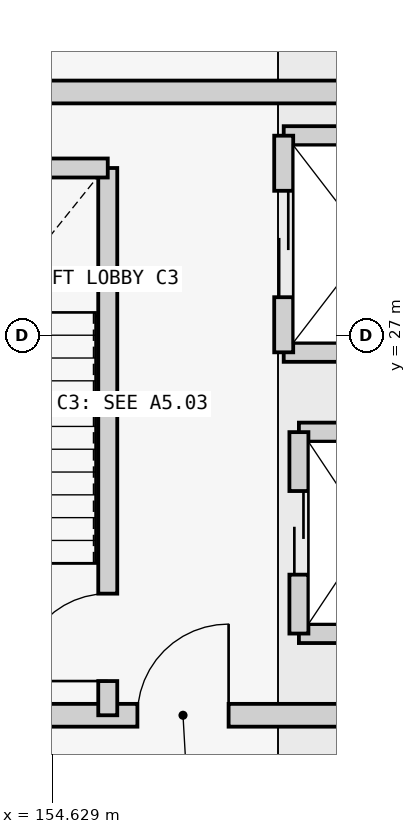
"""IFC4 building model, lengths in metres.
Left out: names, types, materials, properties, quantities, classifications, styles, units other than length and angle.
Written with IfcOpenShell. Run it as: python <this file> out.ifc"""

import sys

from ifc_helpers import new_model, si_unit, direction, frame, frame_2d, origin, place, context, subcontext, project, spatial, rectangle, extrude, element, fill, save


model = new_model("IFC4")
c1 = context("Model", 3, precision=1e-05, world=origin(), true_north=direction((0.0, 1.0)))
c2 = subcontext(c1, "Body", "Model", "MODEL_VIEW")
j1 = project(units=[si_unit("LENGTHUNIT", "METRE"), si_unit("PLANEANGLEUNIT", "RADIAN")], contexts=[c1])
p1 = place(None, origin())
s1 = spatial("IfcSite", under=j1, at=p1, CompositionType="ELEMENT")
p2 = place(p1, origin())
s2 = spatial("IfcBuilding", under=s1, at=p2, CompositionType="ELEMENT")
p3 = place(p2, frame((0.0, 0.0, 4.2)))
s3 = spatial("IfcBuildingStorey", under=s2, at=p3, CompositionType="ELEMENT", Elevation=4.2)
p4 = place(p3, frame((151.0, 22.0, 0.0), z_axis=(0.0, 0.0, 1.0), x_axis=(1.0, 0.0, 0.0)))
e1 = element("IfcWall", 1, at=p4, inside=s3, PredefinedType="SHEAR", context=c2, shape_type="SweptSolid", body=[
    extrude(rectangle(XDim=10.2, YDim=0.3, at=frame_2d((5.1, 0.0))), origin(), (0.0, 0.0, 1.0), 3.945),
])
p5 = place(p4, frame((4.75, 0.0, 0.0)))
e2 = element("IfcOpeningElement", 2, at=p5, cuts=e1, PredefinedType="OPENING", context=c2, shape_type="SweptSolid", body=[
    extrude(rectangle(XDim=1.2, YDim=2.15, at=frame_2d((0.6, 1.075))), frame((0.0, 0.16, 0.0), z_axis=(0.0, -1.0, 0.0), x_axis=(1.0, 0.0, 0.0)), (0.0, 0.0, 1.0), 0.32),
])
p6 = place(p3, frame((161.2, 30.2, 0.0), z_axis=(0.0, 0.0, 1.0), x_axis=(-1.0, 0.0, 0.0)))
e3 = element("IfcWall", 3, at=p6, inside=s3, PredefinedType="SHEAR", context=c2, shape_type="SweptSolid", body=[
    extrude(rectangle(XDim=10.2, YDim=0.3, at=frame_2d((5.1, 0.0))), origin(), (0.0, 0.0, 1.0), 3.945),
])
p7 = place(p3, frame((155.36, 22.0, 0.0), z_axis=(0.0, 0.0, 1.0), x_axis=(0.0, 1.0, 0.0)))
e4 = element("IfcWall", 4, at=p7, inside=s3, PredefinedType="SHEAR", context=c2, shape_type="SweptSolid", body=[
    extrude(rectangle(XDim=7.2, YDim=0.25, at=frame_2d((3.6, 0.0))), origin(), (0.0, 0.0, 1.0), 3.945),
])
p8 = place(p7, frame((0.45, 0.0, 0.0)))
e5 = element("IfcOpeningElement", 5, at=p8, cuts=e4, PredefinedType="OPENING", context=c2, shape_type="SweptSolid", body=[
    extrude(rectangle(XDim=1.15, YDim=2.15, at=frame_2d((0.575, 1.075))), frame((0.0, 0.135, 0.0), z_axis=(0.0, -1.0, 0.0), x_axis=(1.0, 0.0, 0.0)), (0.0, 0.0, 1.0), 0.27),
])
p9 = place(p3, frame((151.0, 29.2, 0.0), z_axis=(0.0, 0.0, 1.0), x_axis=(1.0, 0.0, 0.0)))
e6 = element("IfcWall", 6, at=p9, inside=s3, PredefinedType="SHEAR", context=c2, shape_type="SweptSolid", body=[
    extrude(rectangle(XDim=4.36, YDim=0.25, at=frame_2d((2.18, 0.0))), origin(), (0.0, 0.0, 1.0), 3.945),
])
for number, where, z_axis, x_axis in (
    (7, (157.875, 23.075, 0.0), (0.0, 0.0, 1.0), (1.0, 0.0, 0.0)),
    (8, (157.875, 25.725, 0.0), (0.0, 0.0, 1.0), (1.0, 0.0, 0.0)),
):
    element("IfcWall", number, at=place(p3, frame(where, z_axis=z_axis, x_axis=x_axis)), inside=s3, PredefinedType="SHEAR", context=c2, shape_type="SweptSolid", body=[
        extrude(rectangle(XDim=1.85, YDim=0.25, at=frame_2d((0.925, 0.0))), origin(), (0.0, 0.0, 1.0), 3.945),
    ])
p10 = place(p3, frame((157.875, 23.075, 0.0), z_axis=(0.0, 0.0, 1.0), x_axis=(0.0, 1.0, 0.0)))
e9 = element("IfcWall", 9, at=p10, inside=s3, PredefinedType="SHEAR", context=c2, shape_type="SweptSolid", body=[
    extrude(rectangle(XDim=2.65, YDim=0.25, at=frame_2d((1.325, 0.0))), origin(), (0.0, 0.0, 1.0), 3.945),
])
p11 = place(p10, frame((0.775, 0.0, 0.0)))
e10 = element("IfcOpeningElement", 10, at=p11, cuts=e9, PredefinedType="OPENING", context=c2, shape_type="SweptSolid", body=[
    extrude(rectangle(XDim=1.1, YDim=2.15, at=frame_2d((0.55, 1.075))), frame((0.0, 0.135, 0.0), z_axis=(0.0, -1.0, 0.0), x_axis=(1.0, 0.0, 0.0)), (0.0, 0.0, 1.0), 0.27),
])
for number, where, z_axis, x_axis in (
    (11, (157.675, 26.775, 0.0), (0.0, 0.0, 1.0), (1.0, 0.0, 0.0)),
    (12, (157.675, 29.625, 0.0), (0.0, 0.0, 1.0), (1.0, 0.0, 0.0)),
):
    element("IfcWall", number, at=place(p3, frame(where, z_axis=z_axis, x_axis=x_axis)), inside=s3, PredefinedType="SHEAR", context=c2, shape_type="SweptSolid", body=[
        extrude(rectangle(XDim=2.25, YDim=0.25, at=frame_2d((1.125, 0.0))), origin(), (0.0, 0.0, 1.0), 3.945),
    ])
p12 = place(p3, frame((157.675, 26.775, 0.0), z_axis=(0.0, 0.0, 1.0), x_axis=(0.0, 1.0, 0.0)))
e13 = element("IfcWall", 13, at=p12, inside=s3, PredefinedType="SHEAR", context=c2, shape_type="SweptSolid", body=[
    extrude(rectangle(XDim=2.85, YDim=0.25, at=frame_2d((1.425, 0.0))), origin(), (0.0, 0.0, 1.0), 3.945),
])
p13 = place(p12, frame((0.725, 0.0, 0.0)))
e14 = element("IfcOpeningElement", 14, at=p13, cuts=e13, PredefinedType="OPENING", context=c2, shape_type="SweptSolid", body=[
    extrude(rectangle(XDim=1.4, YDim=2.2, at=frame_2d((0.7, 1.1))), frame((0.0, 0.135, 0.0), z_axis=(0.0, -1.0, 0.0), x_axis=(1.0, 0.0, 0.0)), (0.0, 0.0, 1.0), 0.27),
])
p14 = place(p8, origin())
e15 = element("IfcDoor", 15, at=p14, inside=s3, OperationType="SINGLE_SWING_LEFT", PredefinedType="DOOR", context=c2, shape_type="SweptSolid", body=[
    extrude(rectangle(XDim=1.15, YDim=2.15, at=frame_2d((0.575, 1.075))), frame((0.0, 0.025, 0.0), z_axis=(0.0, -1.0, 0.0), x_axis=(1.0, 0.0, 0.0)), (0.0, 0.0, 1.0), 0.05),
])
fill(e5, e15)
p15 = place(p5, origin())
e16 = element("IfcDoor", 16, at=p15, inside=s3, OperationType="SINGLE_SWING_RIGHT", PredefinedType="DOOR", context=c2, shape_type="SweptSolid", body=[
    extrude(rectangle(XDim=1.2, YDim=2.15, at=frame_2d((0.6, 1.075))), frame((0.0, 0.025, 0.0), z_axis=(0.0, -1.0, 0.0), x_axis=(1.0, 0.0, 0.0)), (0.0, 0.0, 1.0), 0.05),
])
fill(e2, e16)
p16 = place(p11, origin())
e17 = element("IfcDoor", 17, at=p16, inside=s3, OperationType="DOUBLE_DOOR_SLIDING", PredefinedType="USERDEFINED", context=c2, shape_type="SweptSolid", body=[
    extrude(rectangle(XDim=1.1, YDim=2.15, at=frame_2d((0.55, 1.075))), frame((0.0, 0.025, 0.0), z_axis=(0.0, -1.0, 0.0), x_axis=(1.0, 0.0, 0.0)), (0.0, 0.0, 1.0), 0.05),
])
fill(e10, e17)
p17 = place(p13, origin())
e18 = element("IfcDoor", 18, at=p17, inside=s3, OperationType="DOUBLE_DOOR_SLIDING", PredefinedType="USERDEFINED", context=c2, shape_type="SweptSolid", body=[
    extrude(rectangle(XDim=1.4, YDim=2.2, at=frame_2d((0.7, 1.1))), frame((0.0, 0.025, 0.0), z_axis=(0.0, -1.0, 0.0), x_axis=(1.0, 0.0, 0.0)), (0.0, 0.0, 1.0), 0.05),
])
fill(e14, e18)
save(model, sys.argv[1])
